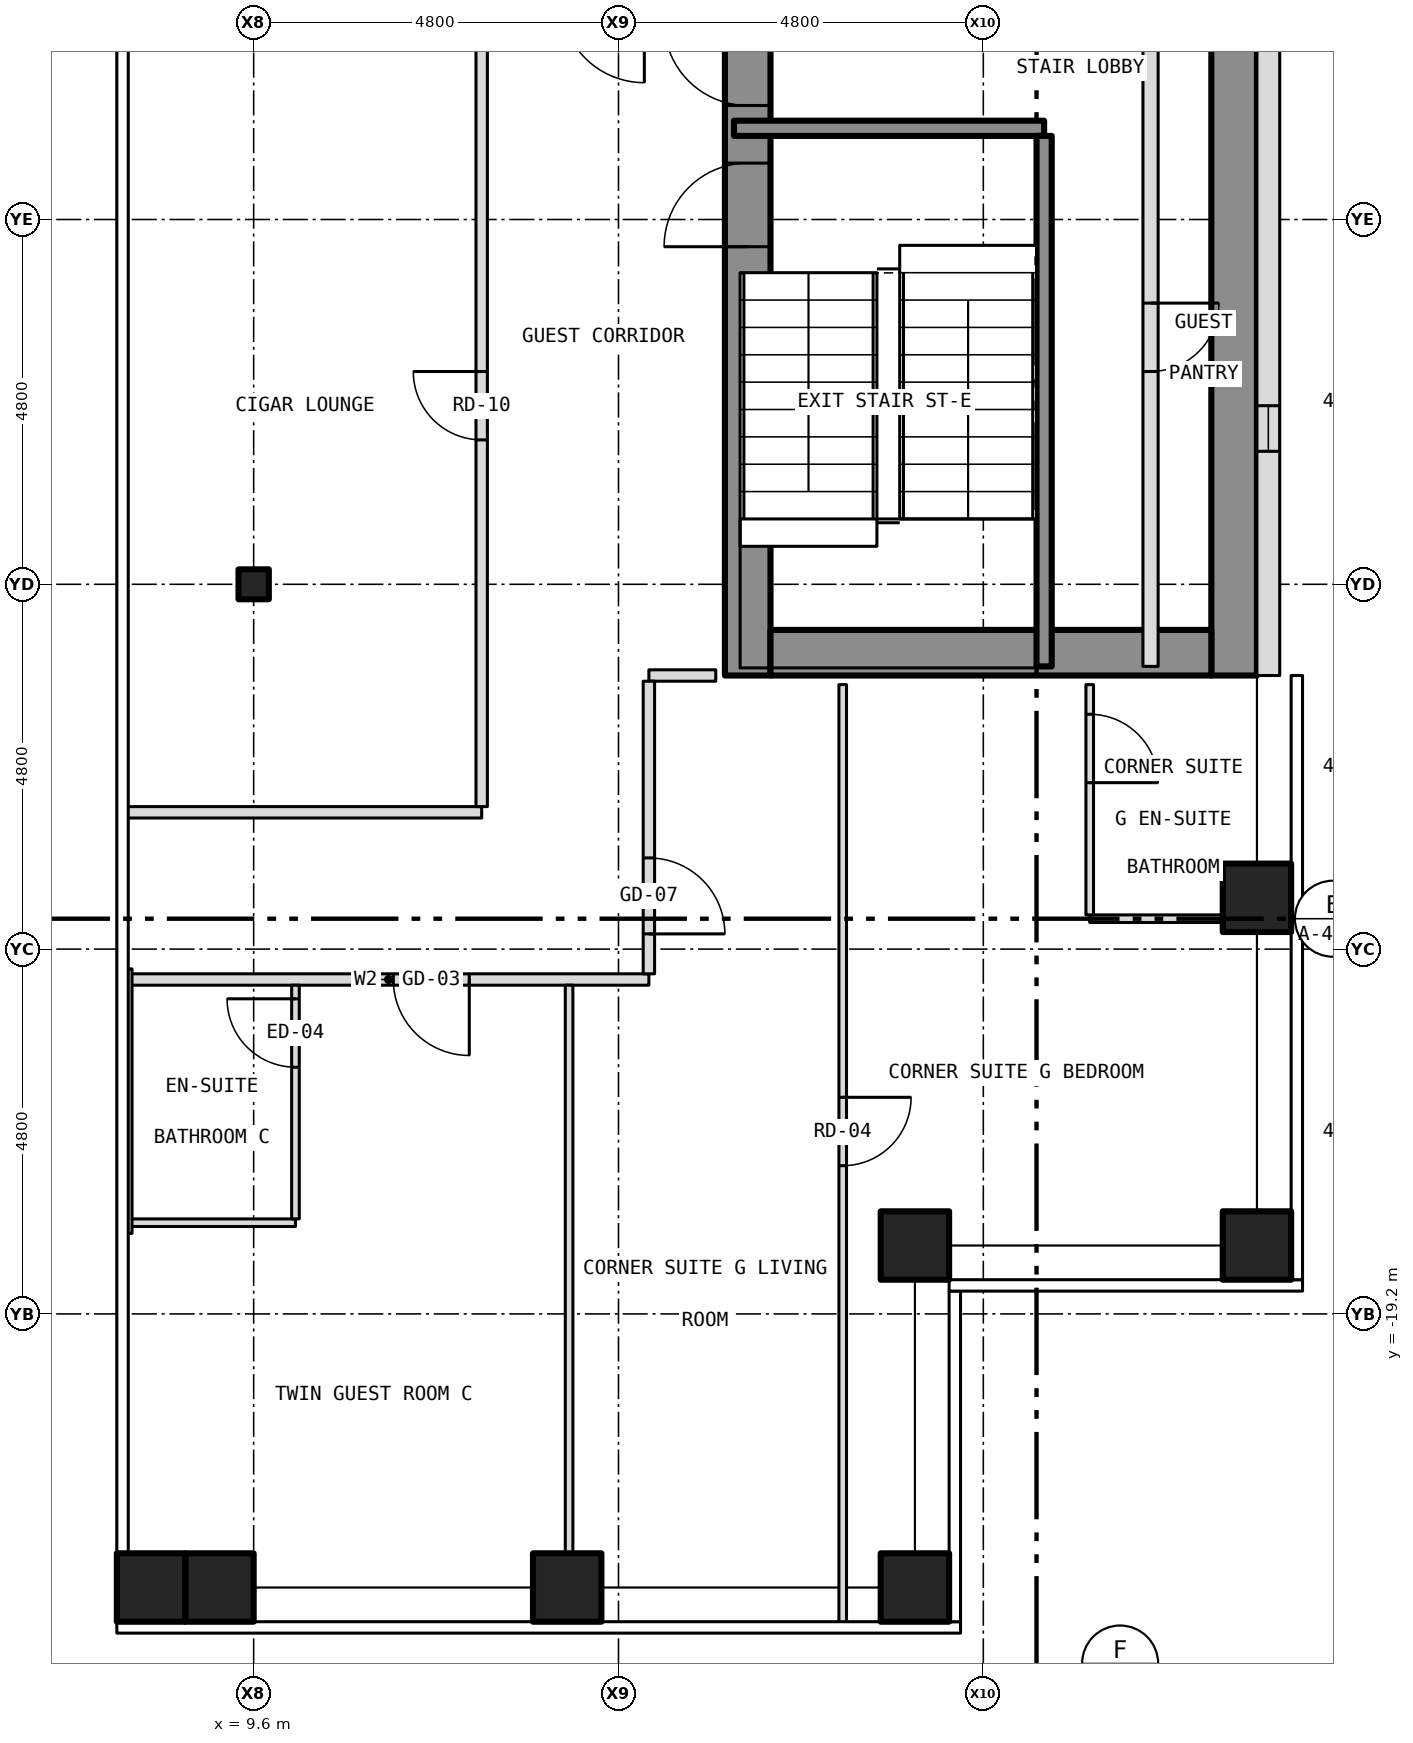
"""IFC4 building model, lengths in metres.
Left out: names, types, materials, properties, quantities, classifications, styles, units other than length and angle.
Written with IfcOpenShell. Run it as: python <this file> out.ifc"""

import sys

from ifc_helpers import new_model, si_unit, direction, frame, frame_2d, origin, origin_2d, place, context, subcontext, project, spatial, rectangle, hollow_rectangle, i_section, extrude, element, fill, save


model = new_model("IFC4")
c1 = context("Model", 3, precision=1e-05, world=origin(), true_north=direction((0.0, 1.0)))
c2 = subcontext(c1, "Body", "Model", "MODEL_VIEW")
j1 = project(units=[si_unit("LENGTHUNIT", "METRE"), si_unit("PLANEANGLEUNIT", "RADIAN")], contexts=[c1])
p1 = place(None, origin())
s1 = spatial("IfcSite", under=j1, at=p1, CompositionType="ELEMENT")
p2 = place(p1, origin())
s2 = spatial("IfcBuilding", under=s1, at=p2, CompositionType="ELEMENT")
p3 = place(p2, frame((0.0, 0.0, 127.5)))
s3 = spatial("IfcBuildingStorey", under=s2, at=p3, CompositionType="ELEMENT", Elevation=127.5)
for number, where, z_axis, x_axis in (
    (1, (9.15, -22.8, -0.15), (0.0, 0.0, 1.0), (1.0, 0.0, 0.0)),
    (2, (13.725, -22.8, -0.15), (0.0, 0.0, 1.0), (1.0, 0.0, 0.0)),
    (3, (18.3, -22.8, -0.15), (0.0, 0.0, 1.0), (1.0, 0.0, 0.0)),
    (4, (22.8, -18.3, -0.15), (0.0, 0.0, 1.0), (1.0, 0.0, 0.0)),
    (5, (22.8, -13.725, -0.15), (0.0, 0.0, 1.0), (1.0, 0.0, 0.0)),
    (6, (18.3, -18.3, -0.15), (0.0, 0.0, 1.0), (1.0, 0.0, 0.0)),
    (7, (8.25, -22.8, -0.15), (0.0, 0.0, 1.0), (1.0, 0.0, 0.0)),
):
    element("IfcColumn", number, at=place(p3, frame(where, z_axis=z_axis, x_axis=x_axis)), inside=s3, PredefinedType="COLUMN", context=c2, shape_type="SweptSolid", body=[
        extrude(hollow_rectangle(XDim=0.9, YDim=0.9, WallThickness=0.05, at=origin_2d()), origin(), (0.0, 0.0, 1.0), 3.5),
    ])
p4 = place(p3, frame((9.6, -9.6, -0.15), z_axis=(0.0, 0.0, 1.0), x_axis=(1.0, 0.0, 0.0)))
e8 = element("IfcColumn", 8, at=p4, inside=s3, PredefinedType="COLUMN", context=c2, shape_type="SweptSolid", body=[
    extrude(i_section(OverallWidth=0.399, OverallDepth=0.394, WebThickness=0.023, FlangeThickness=0.037, at=origin_2d()), origin(), (0.0, 0.0, 1.0), 3.5),
])
p5 = place(p3, frame((16.1, -10.8, 0.0), z_axis=(0.0, 0.0, 1.0), x_axis=(0.0, 1.0, 0.0)))
e9 = element("IfcWall", 9, at=p5, inside=s3, PredefinedType="SHEAR", context=c2, shape_type="SweptSolid", body=[
    extrude(rectangle(XDim=21.6, YDim=0.6, at=frame_2d((10.8, 0.0))), origin(), (0.0, 0.0, 1.0), 3.25),
])
p6 = place(p5, frame((9.4, 0.0, 0.0)))
e10 = element("IfcOpeningElement", 10, at=p6, cuts=e9, PredefinedType="OPENING", context=c2, shape_type="SweptSolid", body=[
    extrude(rectangle(XDim=1.1, YDim=2.1, at=frame_2d((0.55, 1.05))), frame((0.0, 0.312, 0.0), z_axis=(0.0, -1.0, 0.0), x_axis=(1.0, 0.0, 0.0)), (0.0, 0.0, 1.0), 0.624),
])
p7 = place(p5, frame((11.5, 0.0, 0.0)))
e11 = element("IfcOpeningElement", 11, at=p7, cuts=e9, PredefinedType="OPENING", context=c2, shape_type="SweptSolid", body=[
    extrude(rectangle(XDim=1.1, YDim=2.1, at=frame_2d((0.55, 1.05))), frame((0.0, 0.312, 0.0), z_axis=(0.0, -1.0, 0.0), x_axis=(1.0, 0.0, 0.0)), (0.0, 0.0, 1.0), 0.624),
])
p8 = place(p5, frame((13.6, 0.0, 0.0)))
e12 = element("IfcOpeningElement", 12, at=p8, cuts=e9, PredefinedType="OPENING", context=c2, shape_type="SweptSolid", body=[
    extrude(rectangle(XDim=1.1, YDim=2.1, at=frame_2d((0.55, 1.05))), frame((0.0, 0.312, 0.0), z_axis=(0.0, -1.0, 0.0), x_axis=(1.0, 0.0, 0.0)), (0.0, 0.0, 1.0), 0.624),
])
p9 = place(p5, frame((15.7, 0.0, 0.0)))
e13 = element("IfcOpeningElement", 13, at=p9, cuts=e9, PredefinedType="OPENING", context=c2, shape_type="SweptSolid", body=[
    extrude(rectangle(XDim=1.1, YDim=2.1, at=frame_2d((0.55, 1.05))), frame((0.0, 0.312, 0.0), z_axis=(0.0, -1.0, 0.0), x_axis=(1.0, 0.0, 0.0)), (0.0, 0.0, 1.0), 0.624),
])
p10 = place(p5, frame((17.8, 0.0, 0.0)))
e14 = element("IfcOpeningElement", 14, at=p10, cuts=e9, PredefinedType="OPENING", context=c2, shape_type="SweptSolid", body=[
    extrude(rectangle(XDim=1.1, YDim=2.1, at=frame_2d((0.55, 1.05))), frame((0.0, 0.312, 0.0), z_axis=(0.0, -1.0, 0.0), x_axis=(1.0, 0.0, 0.0)), (0.0, 0.0, 1.0), 0.624),
])
p11 = place(p5, frame((5.642, 0.0, 0.0)))
e15 = element("IfcOpeningElement", 15, at=p11, cuts=e9, PredefinedType="OPENING", context=c2, shape_type="SweptSolid", body=[
    extrude(rectangle(XDim=1.1, YDim=2.1, at=frame_2d((0.55, 1.05))), frame((0.0, 0.312, 0.0), z_axis=(0.0, -1.0, 0.0), x_axis=(1.0, 0.0, 0.0)), (0.0, 0.0, 1.0), 0.624),
])
p12 = place(p5, frame((7.5, 0.0, 0.0)))
e16 = element("IfcOpeningElement", 16, at=p12, cuts=e9, PredefinedType="OPENING", context=c2, shape_type="SweptSolid", body=[
    extrude(rectangle(XDim=1.1, YDim=2.1, at=frame_2d((0.55, 1.05))), frame((0.0, 0.312, 0.0), z_axis=(0.0, -1.0, 0.0), x_axis=(1.0, 0.0, 0.0)), (0.0, 0.0, 1.0), 0.624),
])
p13 = place(p3, frame((22.5, -10.8, 0.0), z_axis=(0.0, 0.0, 1.0), x_axis=(0.0, 1.0, 0.0)))
e17 = element("IfcWall", 17, at=p13, inside=s3, PredefinedType="SHEAR", context=c2, shape_type="SweptSolid", body=[
    extrude(rectangle(XDim=21.6, YDim=0.6, at=frame_2d((10.8, 0.0))), origin(), (0.0, 0.0, 1.0), 3.25),
])
p14 = place(p3, frame((16.4, -10.5, 0.0), z_axis=(0.0, 0.0, 1.0), x_axis=(1.0, 0.0, 0.0)))
e18 = element("IfcWall", 18, at=p14, inside=s3, PredefinedType="SHEAR", context=c2, shape_type="SweptSolid", body=[
    extrude(rectangle(XDim=5.8, YDim=0.6, at=frame_2d((2.9, 0.0))), origin(), (0.0, 0.0, 1.0), 3.25),
])
p15 = place(p3, frame((22.95, -10.8, 0.0), z_axis=(0.0, 0.0, 1.0), x_axis=(0.0, 1.0, 0.0)))
e19 = element("IfcWall", 19, at=p15, inside=s3, PredefinedType="SOLIDWALL", context=c2, shape_type="SweptSolid", body=[
    extrude(rectangle(XDim=21.6, YDim=0.3, at=frame_2d((10.8, 0.0))), origin(), (0.0, 0.0, 1.0), 3.5),
])
p16 = place(p15, frame((2.95, 0.0, 1.0)))
e20 = element("IfcOpeningElement", 20, at=p16, cuts=e19, PredefinedType="OPENING", context=c2, shape_type="SweptSolid", body=[
    extrude(rectangle(XDim=0.6, YDim=1.5, at=frame_2d((0.3, 0.75))), frame((0.0, 0.162, 0.0), z_axis=(0.0, -1.0, 0.0), x_axis=(1.0, 0.0, 0.0)), (0.0, 0.0, 1.0), 0.324),
])
p17 = place(p3, frame((7.95, -18.0, 0.0), z_axis=(0.0, 0.0, 1.0), x_axis=(1.0, 0.0, 0.0)))
e21 = element("IfcWall", 21, at=p17, inside=s3, PredefinedType="PARTITIONING", context=c2, shape_type="SweptSolid", body=[
    extrude(rectangle(XDim=2.2, YDim=0.1, at=frame_2d((1.1, 0.0))), origin(), (0.0, 0.0, 1.0), 3.35),
])
p18 = place(p3, frame((7.95, -14.8, 0.0), z_axis=(0.0, 0.0, 1.0), x_axis=(1.0, 0.0, 0.0)))
e22 = element("IfcWall", 22, at=p18, inside=s3, PredefinedType="PARTITIONING", context=c2, shape_type="SweptSolid", body=[
    extrude(rectangle(XDim=6.85, YDim=0.15, at=frame_2d((3.425, 0.0))), origin(), (0.0, 0.0, 1.0), 3.35),
])
p19 = place(p18, frame((3.487, 0.0, 0.0)))
e23 = element("IfcOpeningElement", 23, at=p19, cuts=e22, PredefinedType="OPENING", context=c2, shape_type="SweptSolid", body=[
    extrude(rectangle(XDim=1.0, YDim=2.1, at=frame_2d((0.5, 1.05))), frame((0.0, 0.087, 0.0), z_axis=(0.0, -1.0, 0.0), x_axis=(1.0, 0.0, 0.0)), (0.0, 0.0, 1.0), 0.174),
])
p20 = place(p3, frame((20.6, -14.0, 0.0), z_axis=(0.0, 0.0, 1.0), x_axis=(1.0, 0.0, 0.0)))
e24 = element("IfcWall", 24, at=p20, inside=s3, PredefinedType="PARTITIONING", context=c2, shape_type="SweptSolid", body=[
    extrude(rectangle(XDim=2.08, YDim=0.1, at=frame_2d((1.04, 0.0))), origin(), (0.0, 0.0, 1.0), 3.35),
])
p21 = place(p3, frame((7.92, -12.6, 0.0), z_axis=(0.0, 0.0, 1.0), x_axis=(1.0, 0.0, 0.0)))
e25 = element("IfcWall", 25, at=p21, inside=s3, PredefinedType="PARTITIONING", context=c2, shape_type="SweptSolid", body=[
    extrude(rectangle(XDim=4.68, YDim=0.15, at=frame_2d((2.34, 0.0))), origin(), (0.0, 0.0, 1.0), 3.35),
])
p22 = place(p3, frame((14.8, -10.8, 0.0), z_axis=(0.0, 0.0, 1.0), x_axis=(1.0, 0.0, 0.0)))
e26 = element("IfcWall", 26, at=p22, inside=s3, PredefinedType="PARTITIONING", context=c2, shape_type="SweptSolid", body=[
    extrude(rectangle(XDim=0.88, YDim=0.15, at=frame_2d((0.44, 0.0))), origin(), (0.0, 0.0, 1.0), 3.35),
])
p23 = place(p3, frame((15.92, -3.6, 0.0), z_axis=(0.0, 0.0, 1.0), x_axis=(1.0, 0.0, 0.0)))
e27 = element("IfcWall", 27, at=p23, inside=s3, PredefinedType="SHEAR", context=c2, shape_type="SweptSolid", body=[
    extrude(rectangle(XDim=4.08, YDim=0.2, at=frame_2d((2.04, 0.0))), origin(), (0.0, 0.0, 1.0), 3.25),
])
p24 = place(p3, frame((7.95, -18.14, 0.0), z_axis=(0.0, 0.0, 1.0), x_axis=(0.0, 1.0, 0.0)))
e28 = element("IfcWall", 28, at=p24, inside=s3, PredefinedType="PARTITIONING", context=c2, shape_type="SweptSolid", body=[
    extrude(rectangle(XDim=3.48, YDim=0.1, at=frame_2d((1.74, 0.0))), origin(), (0.0, 0.0, 1.0), 2.733),
])
p25 = place(p3, frame((10.15, -17.95, 0.0), z_axis=(0.0, 0.0, 1.0), x_axis=(0.0, 1.0, 0.0)))
e29 = element("IfcWall", 29, at=p25, inside=s3, PredefinedType="PARTITIONING", context=c2, shape_type="SweptSolid", body=[
    extrude(rectangle(XDim=3.075, YDim=0.1, at=frame_2d((1.538, 0.0))), origin(), (0.0, 0.0, 1.0), 3.35),
])
p26 = place(p25, frame((1.996, 0.0, 0.0)))
e30 = element("IfcOpeningElement", 30, at=p26, cuts=e29, PredefinedType="OPENING", context=c2, shape_type="SweptSolid", body=[
    extrude(rectangle(XDim=0.9, YDim=2.1, at=frame_2d((0.45, 1.05))), frame((0.0, 0.062, 0.0), z_axis=(0.0, -1.0, 0.0), x_axis=(1.0, 0.0, 0.0)), (0.0, 0.0, 1.0), 0.124),
])
p27 = place(p3, frame((12.6, -12.525, 0.0), z_axis=(0.0, 0.0, 1.0), x_axis=(0.0, 1.0, 0.0)))
e31 = element("IfcWall", 31, at=p27, inside=s3, PredefinedType="PARTITIONING", context=c2, shape_type="SweptSolid", body=[
    extrude(rectangle(XDim=10.525, YDim=0.15, at=frame_2d((5.262, 0.0))), origin(), (0.0, 0.0, 1.0), 3.35),
])
p28 = place(p27, frame((4.825, 0.0, 0.0)))
e32 = element("IfcOpeningElement", 32, at=p28, cuts=e31, PredefinedType="OPENING", context=c2, shape_type="SweptSolid", body=[
    extrude(rectangle(XDim=0.9, YDim=2.1, at=frame_2d((0.45, 1.05))), frame((0.0, 0.087, 0.0), z_axis=(0.0, -1.0, 0.0), x_axis=(1.0, 0.0, 0.0)), (0.0, 0.0, 1.0), 0.174),
])
p29 = place(p3, frame((13.75, -22.68, 0.0), z_axis=(0.0, 0.0, 1.0), x_axis=(0.0, 1.0, 0.0)))
e33 = element("IfcWall", 33, at=p29, inside=s3, PredefinedType="PARTITIONING", context=c2, shape_type="SweptSolid", body=[
    extrude(rectangle(XDim=7.805, YDim=0.1, at=frame_2d((3.902, 0.0))), origin(), (0.0, 0.0, 1.0), 3.35),
])
p30 = place(p3, frame((14.8, -14.725, 0.0), z_axis=(0.0, 0.0, 1.0), x_axis=(0.0, 1.0, 0.0)))
e34 = element("IfcWall", 34, at=p30, inside=s3, PredefinedType="PARTITIONING", context=c2, shape_type="SweptSolid", body=[
    extrude(rectangle(XDim=3.85, YDim=0.15, at=frame_2d((1.925, 0.0))), origin(), (0.0, 0.0, 1.0), 3.35),
])
p31 = place(p30, frame((0.525, 0.0, 0.0)))
e35 = element("IfcOpeningElement", 35, at=p31, cuts=e34, PredefinedType="OPENING", context=c2, shape_type="SweptSolid", body=[
    extrude(rectangle(XDim=1.0, YDim=2.1, at=frame_2d((0.5, 1.05))), frame((0.0, 0.087, 0.0), z_axis=(0.0, -1.0, 0.0), x_axis=(1.0, 0.0, 0.0)), (0.0, 0.0, 1.0), 0.174),
])
p32 = place(p3, frame((17.35, -23.28, 0.0), z_axis=(0.0, 0.0, 1.0), x_axis=(0.0, 1.0, 0.0)))
e36 = element("IfcWall", 36, at=p32, inside=s3, PredefinedType="PARTITIONING", context=c2, shape_type="SweptSolid", body=[
    extrude(rectangle(XDim=12.36, YDim=0.1, at=frame_2d((6.18, 0.0))), origin(), (0.0, 0.0, 1.0), 3.35),
])
p33 = place(p32, frame((6.03, 0.0, 0.0)))
e37 = element("IfcOpeningElement", 37, at=p33, cuts=e36, PredefinedType="OPENING", context=c2, shape_type="SweptSolid", body=[
    extrude(rectangle(XDim=0.9, YDim=2.1, at=frame_2d((0.45, 1.05))), frame((0.0, 0.062, 0.0), z_axis=(0.0, -1.0, 0.0), x_axis=(1.0, 0.0, 0.0)), (0.0, 0.0, 1.0), 0.124),
])
p34 = place(p3, frame((20.0, -10.68, 0.0), z_axis=(0.0, 0.0, 1.0), x_axis=(0.0, 1.0, 0.0)))
e38 = element("IfcWall", 38, at=p34, inside=s3, PredefinedType="SHEAR", context=c2, shape_type="SweptSolid", body=[
    extrude(rectangle(XDim=6.98, YDim=0.2, at=frame_2d((3.49, 0.0))), origin(), (0.0, 0.0, 1.0), 3.25),
])
p35 = place(p3, frame((20.6, -13.95, 0.0), z_axis=(0.0, 0.0, 1.0), x_axis=(0.0, 1.0, 0.0)))
e39 = element("IfcWall", 39, at=p35, inside=s3, PredefinedType="PARTITIONING", context=c2, shape_type="SweptSolid", body=[
    extrude(rectangle(XDim=3.03, YDim=0.1, at=frame_2d((1.515, 0.0))), origin(), (0.0, 0.0, 1.0), 3.35),
])
p36 = place(p35, frame((1.74, 0.0, 0.0)))
e40 = element("IfcOpeningElement", 40, at=p36, cuts=e39, PredefinedType="OPENING", context=c2, shape_type="SweptSolid", body=[
    extrude(rectangle(XDim=0.9, YDim=2.1, at=frame_2d((0.45, 1.05))), frame((0.0, 0.062, 0.0), z_axis=(0.0, -1.0, 0.0), x_axis=(1.0, 0.0, 0.0)), (0.0, 0.0, 1.0), 0.124),
])
p37 = place(p3, frame((21.4, -10.68, 0.0), z_axis=(0.0, 0.0, 1.0), x_axis=(0.0, 1.0, 0.0)))
e41 = element("IfcWall", 41, at=p37, inside=s3, PredefinedType="PARTITIONING", context=c2, shape_type="SweptSolid", body=[
    extrude(rectangle(XDim=8.68, YDim=0.2, at=frame_2d((4.34, 0.0))), origin(), (0.0, 0.0, 1.0), 3.25),
])
p38 = place(p37, frame((3.88, 0.0, 0.0)))
e42 = element("IfcOpeningElement", 42, at=p38, cuts=e41, PredefinedType="OPENING", context=c2, shape_type="SweptSolid", body=[
    extrude(rectangle(XDim=0.9, YDim=2.1, at=frame_2d((0.45, 1.05))), frame((0.0, 0.112, 0.0), z_axis=(0.0, -1.0, 0.0), x_axis=(1.0, 0.0, 0.0)), (0.0, 0.0, 1.0), 0.224),
])
p39 = place(p16, origin())
e43 = element("IfcWindow", 43, at=p39, inside=s3, PartitioningType="SINGLE_PANEL", PredefinedType="WINDOW", context=c2, shape_type="SweptSolid", body=[
    extrude(rectangle(XDim=0.6, YDim=1.5, at=frame_2d((0.3, 0.75))), frame((0.0, -0.06, 0.0), z_axis=(0.0, -1.0, 0.0), x_axis=(1.0, 0.0, 0.0)), (0.0, 0.0, 1.0), 0.06),
])
fill(e20, e43)
p40 = place(p11, origin())
e44 = element("IfcDoor", 44, at=p40, inside=s3, OperationType="SINGLE_SWING_LEFT", PredefinedType="DOOR", context=c2, shape_type="SweptSolid", body=[
    extrude(rectangle(XDim=1.1, YDim=2.1, at=frame_2d((0.55, 1.05))), frame((0.0, 0.025, 0.0), z_axis=(0.0, -1.0, 0.0), x_axis=(1.0, 0.0, 0.0)), (0.0, 0.0, 1.0), 0.05),
])
fill(e15, e44)
p41 = place(p12, origin())
e45 = element("IfcDoor", 45, at=p41, inside=s3, OperationType="SINGLE_SWING_RIGHT", PredefinedType="DOOR", context=c2, shape_type="SweptSolid", body=[
    extrude(rectangle(XDim=1.1, YDim=2.1, at=frame_2d((0.55, 1.05))), frame((0.0, 0.025, 0.0), z_axis=(0.0, -1.0, 0.0), x_axis=(1.0, 0.0, 0.0)), (0.0, 0.0, 1.0), 0.05),
])
fill(e16, e45)
p42 = place(p38, origin())
e46 = element("IfcDoor", 46, at=p42, inside=s3, OperationType="SINGLE_SWING_RIGHT", PredefinedType="DOOR", context=c2, shape_type="SweptSolid", body=[
    extrude(rectangle(XDim=0.9, YDim=2.1, at=frame_2d((0.45, 1.05))), frame((0.0, 0.025, 0.0), z_axis=(0.0, -1.0, 0.0), x_axis=(1.0, 0.0, 0.0)), (0.0, 0.0, 1.0), 0.05),
])
fill(e42, e46)
p43 = place(p19, origin())
e47 = element("IfcDoor", 47, at=p43, inside=s3, OperationType="SINGLE_SWING_RIGHT", PredefinedType="DOOR", context=c2, shape_type="SweptSolid", body=[
    extrude(rectangle(XDim=1.0, YDim=2.1, at=frame_2d((0.5, 1.05))), frame((0.0, 0.025, 0.0), z_axis=(0.0, -1.0, 0.0), x_axis=(1.0, 0.0, 0.0)), (0.0, 0.0, 1.0), 0.05),
])
fill(e23, e47)
p44 = place(p26, origin())
e48 = element("IfcDoor", 48, at=p44, inside=s3, OperationType="SINGLE_SWING_RIGHT", PredefinedType="DOOR", context=c2, shape_type="SweptSolid", body=[
    extrude(rectangle(XDim=0.9, YDim=2.1, at=frame_2d((0.45, 1.05))), frame((0.0, 0.025, 0.0), z_axis=(0.0, -1.0, 0.0), x_axis=(1.0, 0.0, 0.0)), (0.0, 0.0, 1.0), 0.05),
])
fill(e30, e48)
p45 = place(p31, origin())
e49 = element("IfcDoor", 49, at=p45, inside=s3, OperationType="SINGLE_SWING_LEFT", PredefinedType="DOOR", context=c2, shape_type="SweptSolid", body=[
    extrude(rectangle(XDim=1.0, YDim=2.1, at=frame_2d((0.5, 1.05))), frame((0.0, 0.025, 0.0), z_axis=(0.0, -1.0, 0.0), x_axis=(1.0, 0.0, 0.0)), (0.0, 0.0, 1.0), 0.05),
])
fill(e35, e49)
p46 = place(p33, origin())
e50 = element("IfcDoor", 50, at=p46, inside=s3, OperationType="SINGLE_SWING_RIGHT", PredefinedType="DOOR", context=c2, shape_type="SweptSolid", body=[
    extrude(rectangle(XDim=0.9, YDim=2.1, at=frame_2d((0.45, 1.05))), frame((0.0, 0.025, 0.0), z_axis=(0.0, -1.0, 0.0), x_axis=(1.0, 0.0, 0.0)), (0.0, 0.0, 1.0), 0.05),
])
fill(e37, e50)
p47 = place(p36, origin())
e51 = element("IfcDoor", 51, at=p47, inside=s3, OperationType="SINGLE_SWING_LEFT", PredefinedType="DOOR", context=c2, shape_type="SweptSolid", body=[
    extrude(rectangle(XDim=0.9, YDim=2.1, at=frame_2d((0.45, 1.05))), frame((0.0, 0.025, 0.0), z_axis=(0.0, -1.0, 0.0), x_axis=(1.0, 0.0, 0.0)), (0.0, 0.0, 1.0), 0.05),
])
fill(e40, e51)
p48 = place(p28, origin())
e52 = element("IfcDoor", 52, at=p48, inside=s3, OperationType="SINGLE_SWING_RIGHT", PredefinedType="DOOR", context=c2, shape_type="SweptSolid", body=[
    extrude(rectangle(XDim=0.9, YDim=2.1, at=frame_2d((0.45, 1.05))), frame((0.0, 0.025, 0.0), z_axis=(0.0, -1.0, 0.0), x_axis=(1.0, 0.0, 0.0)), (0.0, 0.0, 1.0), 0.05),
])
fill(e32, e52)
save(model, sys.argv[1])
